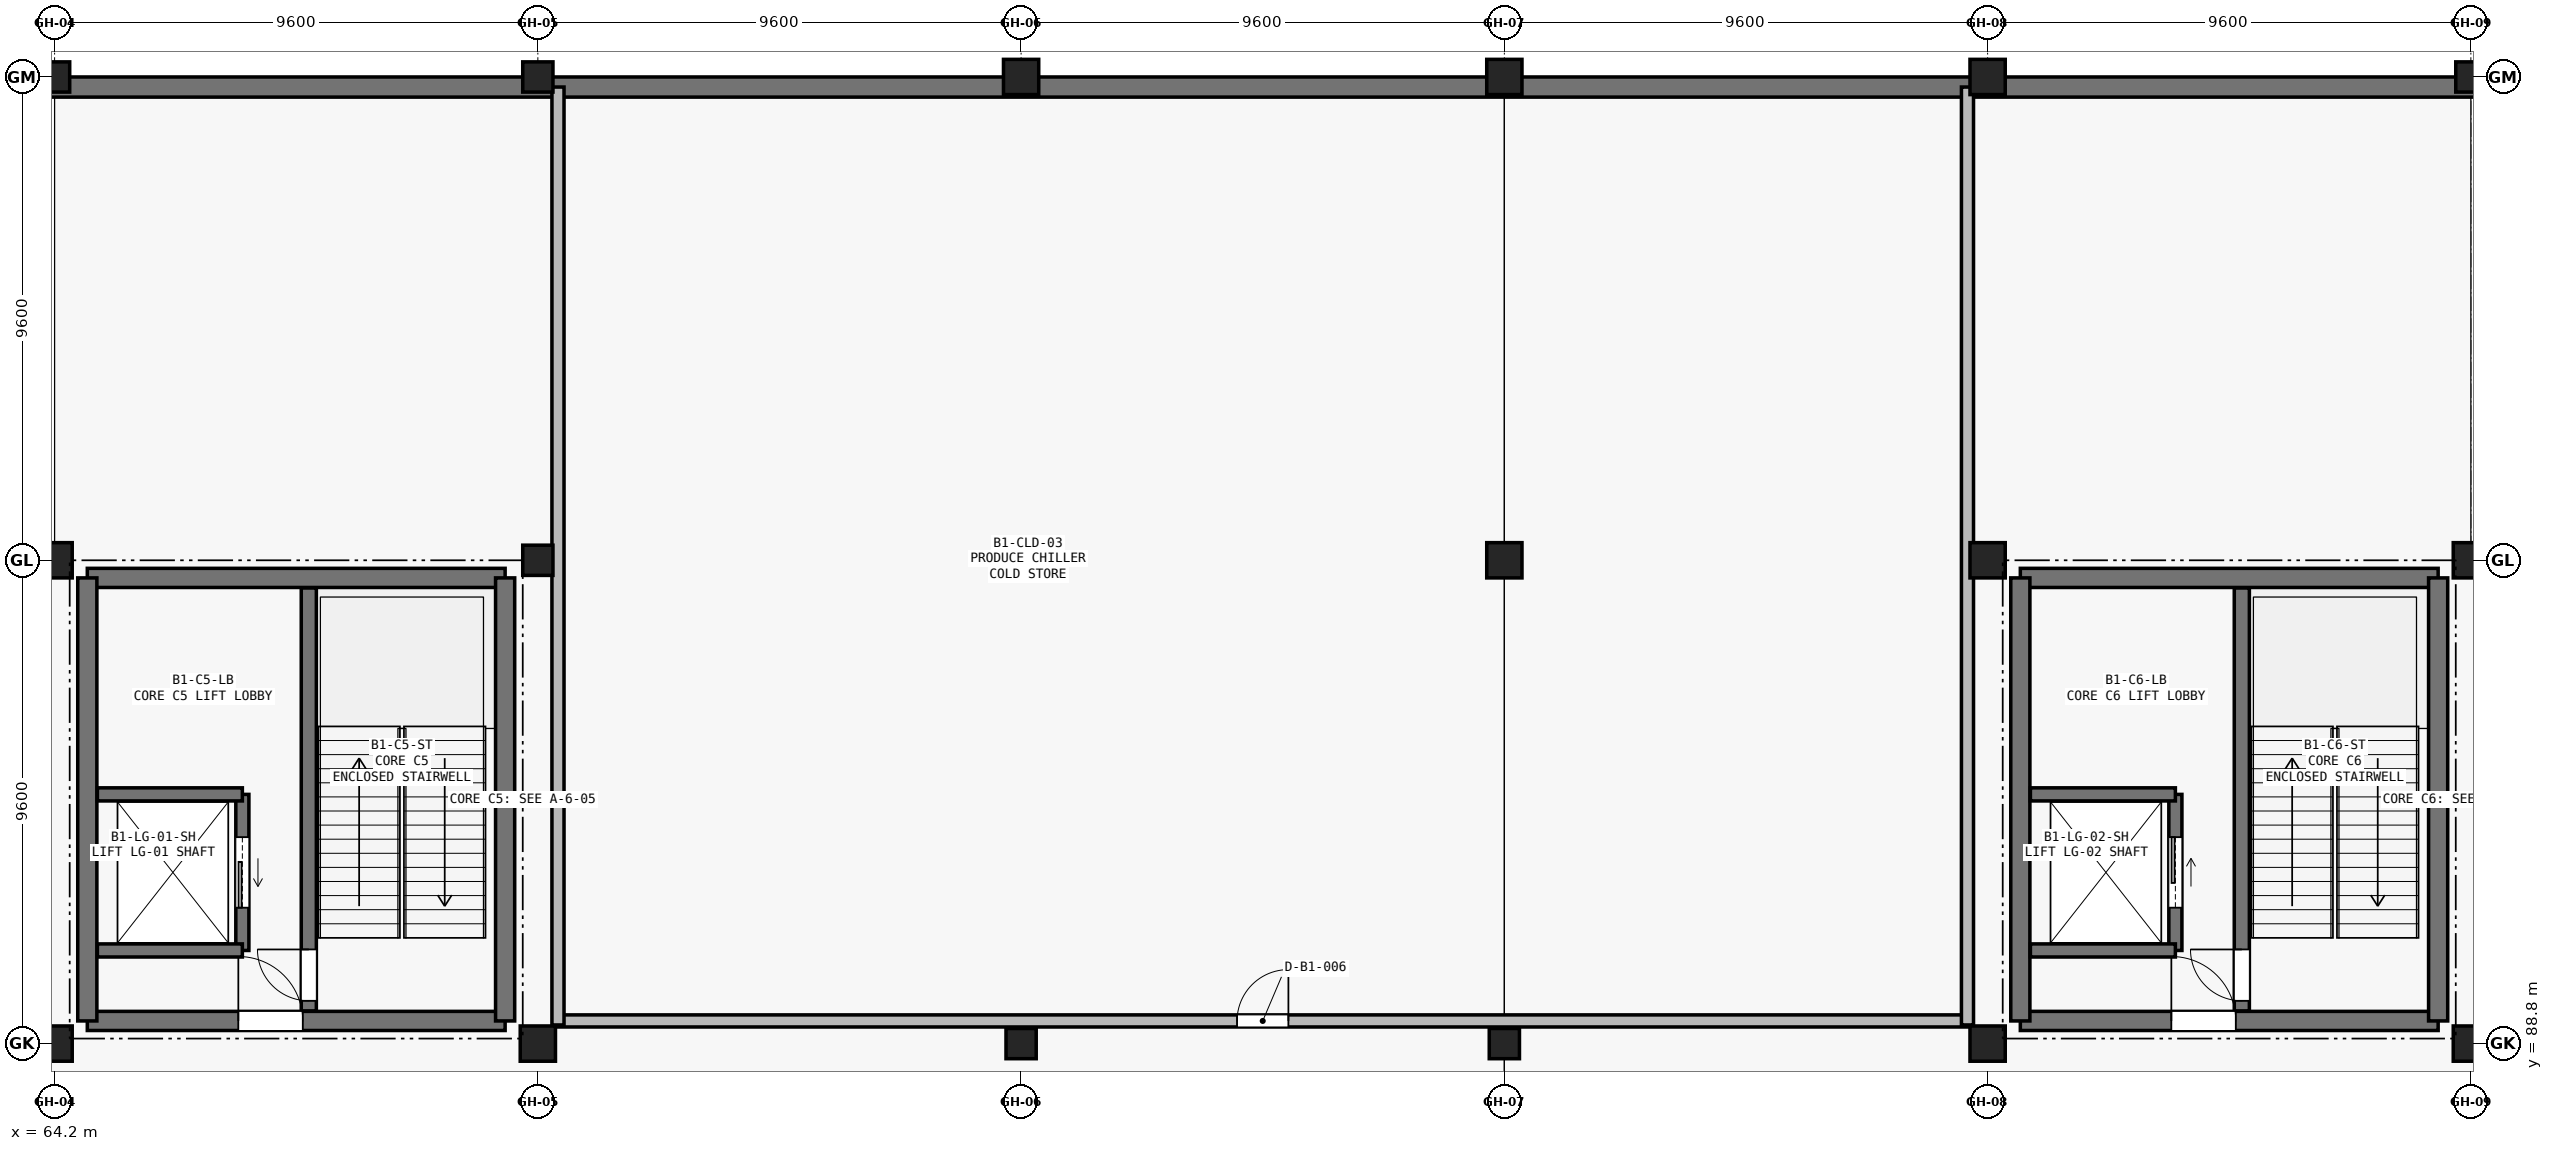
"""IFC4 building model, lengths in metres.
Left out: names, types, materials, properties, quantities, classifications, styles, units other than length and angle.
Written with IfcOpenShell. Run it as: python <this file> out.ifc"""

import sys

from ifc_helpers import new_model, si_unit, direction, frame, frame_2d, origin, origin_2d, place, context, subcontext, project, spatial, rectangle, circle, extrude, element, fill, save


model = new_model("IFC4")
c1 = context("Model", 3, precision=1e-05, world=origin(), true_north=direction((0.0, 1.0)))
c2 = subcontext(c1, "Body", "Model", "MODEL_VIEW")
j1 = project(units=[si_unit("LENGTHUNIT", "METRE"), si_unit("PLANEANGLEUNIT", "RADIAN")], contexts=[c1])
p1 = place(None, origin())
s1 = spatial("IfcSite", under=j1, at=p1, CompositionType="ELEMENT")
p2 = place(p1, origin())
s2 = spatial("IfcBuilding", under=s1, at=p2, CompositionType="ELEMENT")
p3 = place(p2, frame((0.0, 0.0, -5.4)))
s3 = spatial("IfcBuildingStorey", under=s2, at=p3, CompositionType="ELEMENT", Elevation=-5.4)
for number, where, z_axis, x_axis in (
    (1, (64.2, 88.8, 0.0), (0.0, 0.0, 1.0), (1.0, 0.0, 0.0)),
    (2, (64.2, 98.4, 0.0), (0.0, 0.0, 1.0), (1.0, 0.0, 0.0)),
):
    element("IfcColumn", number, at=place(p3, frame(where, z_axis=z_axis, x_axis=x_axis)), inside=s3, PredefinedType="COLUMN", context=c2, shape_type="SweptSolid", body=[
        extrude(circle(Radius=0.35, at=origin_2d()), origin(), (0.0, 0.0, 1.0), 5.4),
    ])
p4 = place(p3, frame((64.2, 108.0, 0.0), z_axis=(0.0, 0.0, 1.0), x_axis=(1.0, 0.0, 0.0)))
e3 = element("IfcColumn", 3, at=p4, inside=s3, PredefinedType="COLUMN", context=c2, shape_type="SweptSolid", body=[
    extrude(rectangle(XDim=0.6, YDim=0.6, at=origin_2d()), origin(), (0.0, 0.0, 1.0), 5.4),
])
p5 = place(p3, frame((73.8, 88.8, 0.0), z_axis=(0.0, 0.0, 1.0), x_axis=(1.0, 0.0, 0.0)))
e4 = element("IfcColumn", 4, at=p5, inside=s3, PredefinedType="COLUMN", context=c2, shape_type="SweptSolid", body=[
    extrude(circle(Radius=0.35, at=origin_2d()), origin(), (0.0, 0.0, 1.0), 5.4),
])
for number, where, z_axis, x_axis in (
    (5, (73.8, 98.4, 0.0), (0.0, 0.0, 1.0), (1.0, 0.0, 0.0)),
    (6, (73.8, 108.0, 0.0), (0.0, 0.0, 1.0), (1.0, 0.0, 0.0)),
    (7, (83.4, 88.8, 0.0), (0.0, 0.0, 1.0), (1.0, 0.0, 0.0)),
    (8, (83.4, 98.4, 0.0), (0.0, 0.0, 1.0), (1.0, 0.0, 0.0)),
):
    element("IfcColumn", number, at=place(p3, frame(where, z_axis=z_axis, x_axis=x_axis)), inside=s3, PredefinedType="COLUMN", context=c2, shape_type="SweptSolid", body=[
        extrude(rectangle(XDim=0.6, YDim=0.6, at=origin_2d()), origin(), (0.0, 0.0, 1.0), 5.4),
    ])
p6 = place(p3, frame((83.4, 108.0, 0.0), z_axis=(0.0, 0.0, 1.0), x_axis=(1.0, 0.0, 0.0)))
e9 = element("IfcColumn", 9, at=p6, inside=s3, PredefinedType="COLUMN", context=c2, shape_type="SweptSolid", body=[
    extrude(circle(Radius=0.35, at=origin_2d()), origin(), (0.0, 0.0, 1.0), 5.4),
])
p7 = place(p3, frame((93.0, 88.8, 0.0), z_axis=(0.0, 0.0, 1.0), x_axis=(1.0, 0.0, 0.0)))
e10 = element("IfcColumn", 10, at=p7, inside=s3, PredefinedType="COLUMN", context=c2, shape_type="SweptSolid", body=[
    extrude(rectangle(XDim=0.6, YDim=0.6, at=origin_2d()), origin(), (0.0, 0.0, 1.0), 5.4),
])
for number, where, z_axis, x_axis in (
    (11, (93.0, 98.4, 0.0), (0.0, 0.0, 1.0), (1.0, 0.0, 0.0)),
    (12, (93.0, 108.0, 0.0), (0.0, 0.0, 1.0), (1.0, 0.0, 0.0)),
    (13, (102.6, 88.8, 0.0), (0.0, 0.0, 1.0), (1.0, 0.0, 0.0)),
    (14, (102.6, 98.4, 0.0), (0.0, 0.0, 1.0), (1.0, 0.0, 0.0)),
    (15, (102.6, 108.0, 0.0), (0.0, 0.0, 1.0), (1.0, 0.0, 0.0)),
    (16, (112.2, 88.8, 0.0), (0.0, 0.0, 1.0), (1.0, 0.0, 0.0)),
    (17, (112.2, 98.4, 0.0), (0.0, 0.0, 1.0), (1.0, 0.0, 0.0)),
):
    element("IfcColumn", number, at=place(p3, frame(where, z_axis=z_axis, x_axis=x_axis)), inside=s3, PredefinedType="COLUMN", context=c2, shape_type="SweptSolid", body=[
        extrude(circle(Radius=0.35, at=origin_2d()), origin(), (0.0, 0.0, 1.0), 5.4),
    ])
p8 = place(p3, frame((112.2, 108.0, 0.0), z_axis=(0.0, 0.0, 1.0), x_axis=(1.0, 0.0, 0.0)))
e18 = element("IfcColumn", 18, at=p8, inside=s3, PredefinedType="COLUMN", context=c2, shape_type="SweptSolid", body=[
    extrude(rectangle(XDim=0.6, YDim=0.6, at=origin_2d()), origin(), (0.0, 0.0, 1.0), 5.4),
])
p9 = place(p3, frame((54.8, 107.8, 0.0), z_axis=(0.0, 0.0, 1.0), x_axis=(1.0, 0.0, 0.0)))
e19 = element("IfcWall", 19, at=p9, inside=s3, PredefinedType="USERDEFINED", context=c2, shape_type="SweptSolid", body=[
    extrude(rectangle(XDim=66.8, YDim=0.4, at=frame_2d((33.4, 0.0))), origin(), (0.0, 0.0, 1.0), 4.85),
])
p10 = place(p3, frame((64.85, 89.25, 0.0), z_axis=(0.0, 0.0, 1.0), x_axis=(1.0, 0.0, 0.0)))
e20 = element("IfcWall", 20, at=p10, inside=s3, PredefinedType="SHEAR", context=c2, shape_type="SweptSolid", body=[
    extrude(rectangle(XDim=8.3, YDim=0.38, at=frame_2d((4.15, 0.0))), origin(), (0.0, 0.0, 1.0), 5.4),
])
p11 = place(p10, frame((3.0, 0.0, 0.0)))
e21 = element("IfcOpeningElement", 21, at=p11, cuts=e20, PredefinedType="OPENING", context=c2, shape_type="SweptSolid", body=[
    extrude(rectangle(XDim=1.28, YDim=2.15, at=frame_2d((0.64, 1.075))), frame((0.0, 0.2, 0.0), z_axis=(0.0, -1.0, 0.0), x_axis=(1.0, 0.0, 0.0)), (0.0, 0.0, 1.0), 0.4),
])
p12 = place(p3, frame((73.15, 98.05, 0.0), z_axis=(0.0, 0.0, 1.0), x_axis=(-1.0, 0.0, 0.0)))
e22 = element("IfcWall", 22, at=p12, inside=s3, PredefinedType="SHEAR", context=c2, shape_type="SweptSolid", body=[
    extrude(rectangle(XDim=8.3, YDim=0.38, at=frame_2d((4.15, 0.0))), origin(), (0.0, 0.0, 1.0), 5.4),
])
for number, where, z_axis, x_axis in (
    (23, (64.85, 98.05, 0.0), (0.0, 0.0, 1.0), (0.0, -1.0, 0.0)),
    (24, (73.15, 89.25, 0.0), (0.0, 0.0, 1.0), (0.0, 1.0, 0.0)),
):
    element("IfcWall", number, at=place(p3, frame(where, z_axis=z_axis, x_axis=x_axis)), inside=s3, PredefinedType="SHEAR", context=c2, shape_type="SweptSolid", body=[
        extrude(rectangle(XDim=8.8, YDim=0.38, at=frame_2d((4.4, 0.0))), origin(), (0.0, 0.0, 1.0), 5.4),
    ])
p13 = place(p3, frame((69.25, 89.45, 0.0), z_axis=(0.0, 0.0, 1.0), x_axis=(0.0, 1.0, 0.0)))
e25 = element("IfcWall", 25, at=p13, inside=s3, PredefinedType="SHEAR", context=c2, shape_type="SweptSolid", body=[
    extrude(rectangle(XDim=8.4, YDim=0.3, at=frame_2d((4.2, 0.0))), origin(), (0.0, 0.0, 1.0), 5.4),
])
p14 = place(p13, frame((0.2, 0.0, 0.0)))
e26 = element("IfcOpeningElement", 26, at=p14, cuts=e25, PredefinedType="OPENING", context=c2, shape_type="SweptSolid", body=[
    extrude(rectangle(XDim=1.02, YDim=2.1, at=frame_2d((0.51, 1.05))), frame((0.0, 0.16, 0.0), z_axis=(0.0, -1.0, 0.0), x_axis=(1.0, 0.0, 0.0)), (0.0, 0.0, 1.0), 0.32),
])
p15 = place(p3, frame((67.93, 90.65, 0.0), z_axis=(0.0, 0.0, 1.0), x_axis=(0.0, 1.0, 0.0)))
e27 = element("IfcWall", 27, at=p15, inside=s3, PredefinedType="SHEAR", context=c2, shape_type="SweptSolid", body=[
    extrude(rectangle(XDim=3.1, YDim=0.26, at=frame_2d((1.55, 0.0))), origin(), (0.0, 0.0, 1.0), 5.4),
])
p16 = place(p15, frame((0.85, 0.0, 0.0)))
e28 = element("IfcOpeningElement", 28, at=p16, cuts=e27, PredefinedType="OPENING", context=c2, shape_type="SweptSolid", body=[
    extrude(rectangle(XDim=1.4, YDim=2.25, at=frame_2d((0.7, 1.125))), frame((0.0, 0.14, 0.0), z_axis=(0.0, -1.0, 0.0), x_axis=(1.0, 0.0, 0.0)), (0.0, 0.0, 1.0), 0.28),
])
for number, where, z_axis, x_axis in (
    (29, (65.05, 90.65, 0.0), (0.0, 0.0, 1.0), (1.0, 0.0, 0.0)),
    (30, (65.05, 93.75, 0.0), (0.0, 0.0, 1.0), (1.0, 0.0, 0.0)),
):
    element("IfcWall", number, at=place(p3, frame(where, z_axis=z_axis, x_axis=x_axis)), inside=s3, PredefinedType="SHEAR", context=c2, shape_type="SweptSolid", body=[
        extrude(rectangle(XDim=2.88, YDim=0.26, at=frame_2d((1.44, 0.0))), origin(), (0.0, 0.0, 1.0), 5.4),
    ])
p17 = place(p3, frame((103.25, 89.25, 0.0), z_axis=(0.0, 0.0, 1.0), x_axis=(1.0, 0.0, 0.0)))
e31 = element("IfcWall", 31, at=p17, inside=s3, PredefinedType="SHEAR", context=c2, shape_type="SweptSolid", body=[
    extrude(rectangle(XDim=8.3, YDim=0.38, at=frame_2d((4.15, 0.0))), origin(), (0.0, 0.0, 1.0), 5.4),
])
p18 = place(p17, frame((3.0, 0.0, 0.0)))
e32 = element("IfcOpeningElement", 32, at=p18, cuts=e31, PredefinedType="OPENING", context=c2, shape_type="SweptSolid", body=[
    extrude(rectangle(XDim=1.28, YDim=2.15, at=frame_2d((0.64, 1.075))), frame((0.0, 0.2, 0.0), z_axis=(0.0, -1.0, 0.0), x_axis=(1.0, 0.0, 0.0)), (0.0, 0.0, 1.0), 0.4),
])
p19 = place(p3, frame((111.55, 98.05, 0.0), z_axis=(0.0, 0.0, 1.0), x_axis=(-1.0, 0.0, 0.0)))
e33 = element("IfcWall", 33, at=p19, inside=s3, PredefinedType="SHEAR", context=c2, shape_type="SweptSolid", body=[
    extrude(rectangle(XDim=8.3, YDim=0.38, at=frame_2d((4.15, 0.0))), origin(), (0.0, 0.0, 1.0), 5.4),
])
for number, where, z_axis, x_axis in (
    (34, (103.25, 98.05, 0.0), (0.0, 0.0, 1.0), (0.0, -1.0, 0.0)),
    (35, (111.55, 89.25, 0.0), (0.0, 0.0, 1.0), (0.0, 1.0, 0.0)),
):
    element("IfcWall", number, at=place(p3, frame(where, z_axis=z_axis, x_axis=x_axis)), inside=s3, PredefinedType="SHEAR", context=c2, shape_type="SweptSolid", body=[
        extrude(rectangle(XDim=8.8, YDim=0.38, at=frame_2d((4.4, 0.0))), origin(), (0.0, 0.0, 1.0), 5.4),
    ])
p20 = place(p3, frame((107.65, 89.45, 0.0), z_axis=(0.0, 0.0, 1.0), x_axis=(0.0, 1.0, 0.0)))
e36 = element("IfcWall", 36, at=p20, inside=s3, PredefinedType="SHEAR", context=c2, shape_type="SweptSolid", body=[
    extrude(rectangle(XDim=8.4, YDim=0.3, at=frame_2d((4.2, 0.0))), origin(), (0.0, 0.0, 1.0), 5.4),
])
p21 = place(p20, frame((0.2, 0.0, 0.0)))
e37 = element("IfcOpeningElement", 37, at=p21, cuts=e36, PredefinedType="OPENING", context=c2, shape_type="SweptSolid", body=[
    extrude(rectangle(XDim=1.02, YDim=2.1, at=frame_2d((0.51, 1.05))), frame((0.0, 0.16, 0.0), z_axis=(0.0, -1.0, 0.0), x_axis=(1.0, 0.0, 0.0)), (0.0, 0.0, 1.0), 0.32),
])
p22 = place(p3, frame((106.33, 90.65, 0.0), z_axis=(0.0, 0.0, 1.0), x_axis=(0.0, 1.0, 0.0)))
e38 = element("IfcWall", 38, at=p22, inside=s3, PredefinedType="SHEAR", context=c2, shape_type="SweptSolid", body=[
    extrude(rectangle(XDim=3.1, YDim=0.26, at=frame_2d((1.55, 0.0))), origin(), (0.0, 0.0, 1.0), 5.4),
])
p23 = place(p22, frame((0.85, 0.0, 0.0)))
e39 = element("IfcOpeningElement", 39, at=p23, cuts=e38, PredefinedType="OPENING", context=c2, shape_type="SweptSolid", body=[
    extrude(rectangle(XDim=1.4, YDim=2.25, at=frame_2d((0.7, 1.125))), frame((0.0, 0.14, 0.0), z_axis=(0.0, -1.0, 0.0), x_axis=(1.0, 0.0, 0.0)), (0.0, 0.0, 1.0), 0.28),
])
for number, where, z_axis, x_axis in (
    (40, (103.45, 90.65, 0.0), (0.0, 0.0, 1.0), (1.0, 0.0, 0.0)),
    (41, (103.45, 93.75, 0.0), (0.0, 0.0, 1.0), (1.0, 0.0, 0.0)),
):
    element("IfcWall", number, at=place(p3, frame(where, z_axis=z_axis, x_axis=x_axis)), inside=s3, PredefinedType="SHEAR", context=c2, shape_type="SweptSolid", body=[
        extrude(rectangle(XDim=2.88, YDim=0.26, at=frame_2d((1.44, 0.0))), origin(), (0.0, 0.0, 1.0), 5.4),
    ])
p24 = place(p3, frame((74.12, 89.25, 0.0), z_axis=(0.0, 0.0, 1.0), x_axis=(1.0, 0.0, 0.0)))
e42 = element("IfcWall", 42, at=p24, inside=s3, PredefinedType="PARTITIONING", context=c2, shape_type="SweptSolid", body=[
    extrude(rectangle(XDim=28.16, YDim=0.24, at=frame_2d((14.08, 0.0))), origin(), (0.0, 0.0, 1.0), 4.92),
])
p25 = place(p24, frame((13.57, 0.0, 0.0)))
e43 = element("IfcOpeningElement", 43, at=p25, cuts=e42, PredefinedType="OPENING", context=c2, shape_type="SweptSolid", body=[
    extrude(rectangle(XDim=1.02, YDim=2.1, at=frame_2d((0.51, 1.05))), frame((0.0, 0.13, 0.0), z_axis=(0.0, -1.0, 0.0), x_axis=(1.0, 0.0, 0.0)), (0.0, 0.0, 1.0), 0.26),
])
for number, where, z_axis, x_axis in (
    (44, (102.2, 89.17, 0.0), (0.0, 0.0, 1.0), (0.0, 1.0, 0.0)),
    (45, (74.2, 107.8, 0.0), (0.0, 0.0, 1.0), (0.0, -1.0, 0.0)),
):
    element("IfcWall", number, at=place(p3, frame(where, z_axis=z_axis, x_axis=x_axis)), inside=s3, PredefinedType="PARTITIONING", context=c2, shape_type="SweptSolid", body=[
        extrude(rectangle(XDim=18.63, YDim=0.24, at=frame_2d((9.315, 0.0))), origin(), (0.0, 0.0, 1.0), 4.92),
    ])
p26 = place(p11, origin())
e46 = element("IfcDoor", 46, at=p26, inside=s3, OperationType="SINGLE_SWING_LEFT", PredefinedType="DOOR", context=c2, shape_type="SweptSolid", body=[
    extrude(rectangle(XDim=1.28, YDim=2.15, at=frame_2d((0.64, 1.075))), frame((0.0, 0.025, 0.0), z_axis=(0.0, -1.0, 0.0), x_axis=(1.0, 0.0, 0.0)), (0.0, 0.0, 1.0), 0.05),
])
fill(e21, e46)
p27 = place(p14, origin())
e47 = element("IfcDoor", 47, at=p27, inside=s3, OperationType="SINGLE_SWING_RIGHT", PredefinedType="DOOR", context=c2, shape_type="SweptSolid", body=[
    extrude(rectangle(XDim=1.02, YDim=2.1, at=frame_2d((0.51, 1.05))), frame((0.0, 0.025, 0.0), z_axis=(0.0, -1.0, 0.0), x_axis=(1.0, 0.0, 0.0)), (0.0, 0.0, 1.0), 0.05),
])
fill(e26, e47)
p28 = place(p16, origin())
e48 = element("IfcDoor", 48, at=p28, inside=s3, OperationType="SLIDING_TO_LEFT", PredefinedType="DOOR", context=c2, shape_type="SweptSolid", body=[
    extrude(rectangle(XDim=1.4, YDim=2.25, at=frame_2d((0.7, 1.125))), frame((0.0, 0.025, 0.0), z_axis=(0.0, -1.0, 0.0), x_axis=(1.0, 0.0, 0.0)), (0.0, 0.0, 1.0), 0.05),
])
fill(e28, e48)
p29 = place(p18, origin())
e49 = element("IfcDoor", 49, at=p29, inside=s3, OperationType="SINGLE_SWING_LEFT", PredefinedType="DOOR", context=c2, shape_type="SweptSolid", body=[
    extrude(rectangle(XDim=1.28, YDim=2.15, at=frame_2d((0.64, 1.075))), frame((0.0, 0.025, 0.0), z_axis=(0.0, -1.0, 0.0), x_axis=(1.0, 0.0, 0.0)), (0.0, 0.0, 1.0), 0.05),
])
fill(e32, e49)
p30 = place(p21, origin())
e50 = element("IfcDoor", 50, at=p30, inside=s3, OperationType="SINGLE_SWING_RIGHT", PredefinedType="DOOR", context=c2, shape_type="SweptSolid", body=[
    extrude(rectangle(XDim=1.02, YDim=2.1, at=frame_2d((0.51, 1.05))), frame((0.0, 0.025, 0.0), z_axis=(0.0, -1.0, 0.0), x_axis=(1.0, 0.0, 0.0)), (0.0, 0.0, 1.0), 0.05),
])
fill(e37, e50)
p31 = place(p23, origin())
e51 = element("IfcDoor", 51, at=p31, inside=s3, OperationType="SLIDING_TO_RIGHT", PredefinedType="DOOR", context=c2, shape_type="SweptSolid", body=[
    extrude(rectangle(XDim=1.4, YDim=2.25, at=frame_2d((0.7, 1.125))), frame((0.0, 0.025, 0.0), z_axis=(0.0, -1.0, 0.0), x_axis=(1.0, 0.0, 0.0)), (0.0, 0.0, 1.0), 0.05),
])
fill(e39, e51)
p32 = place(p25, origin())
e52 = element("IfcDoor", 52, at=p32, inside=s3, OperationType="SINGLE_SWING_RIGHT", PredefinedType="DOOR", context=c2, shape_type="SweptSolid", body=[
    extrude(rectangle(XDim=1.02, YDim=2.1, at=frame_2d((0.51, 1.05))), frame((0.0, 0.025, 0.0), z_axis=(0.0, -1.0, 0.0), x_axis=(1.0, 0.0, 0.0)), (0.0, 0.0, 1.0), 0.05),
])
fill(e43, e52)
save(model, sys.argv[1])
